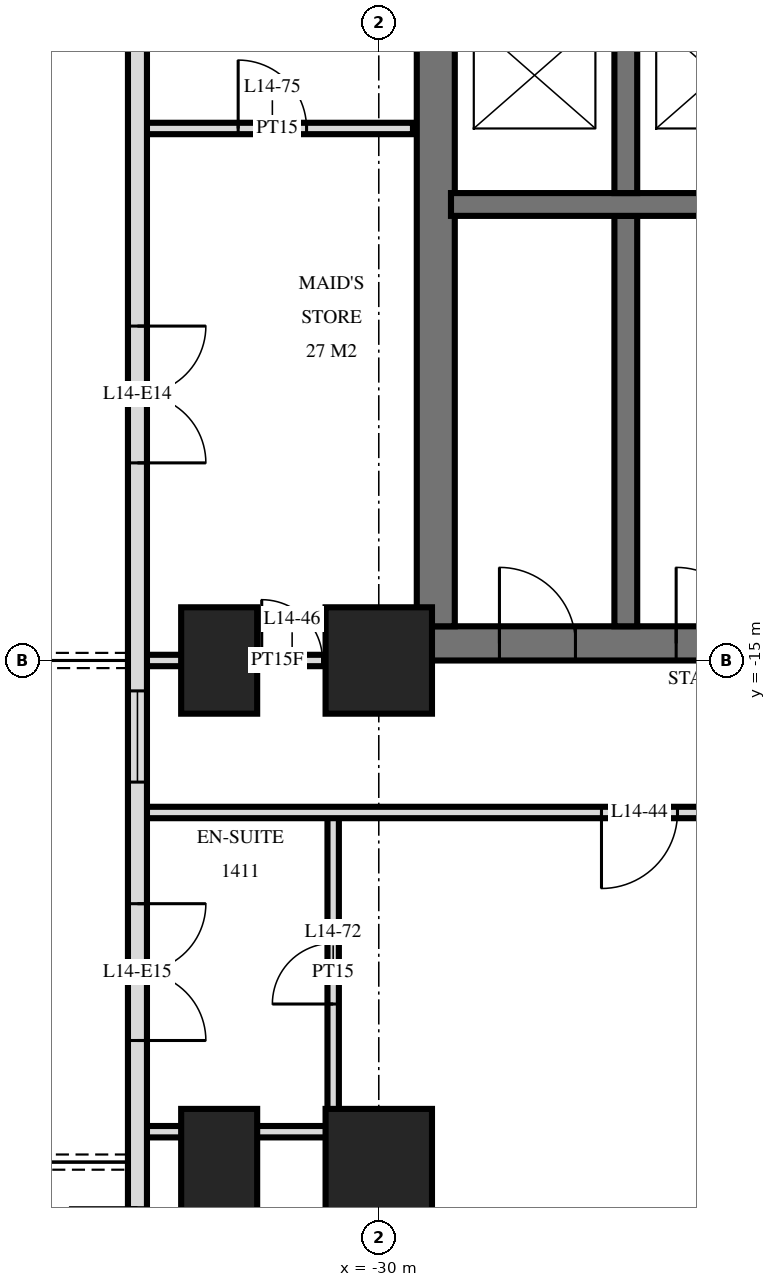
"""IFC4 building model, lengths in metres.
Left out: names, types, materials, properties, quantities, classifications, styles, units other than length and angle.
Written with IfcOpenShell. Run it as: python <this file> out.ifc"""

import sys

from ifc_helpers import new_model, si_unit, direction, frame, frame_2d, origin, origin_2d, place, context, subcontext, project, spatial, rectangle, extrude, element, fill, save


model = new_model("IFC4")
c1 = context("Model", 3, precision=1e-05, world=origin(), true_north=direction((0.0, 1.0)))
c2 = subcontext(c1, "Body", "Model", "MODEL_VIEW")
j1 = project(units=[si_unit("LENGTHUNIT", "METRE"), si_unit("PLANEANGLEUNIT", "RADIAN")], contexts=[c1])
p1 = place(None, origin())
s1 = spatial("IfcSite", under=j1, at=p1, CompositionType="ELEMENT")
p2 = place(p1, origin())
s2 = spatial("IfcBuilding", under=s1, at=p2, CompositionType="ELEMENT")
p3 = place(p2, frame((0.0, 0.0, 60.0)))
s3 = spatial("IfcBuildingStorey", under=s2, at=p3, CompositionType="ELEMENT", Elevation=60.0)
for number, where, z_axis, x_axis in (
    (1, (-32.1, -21.6, 0.0), (0.0, 0.0, 1.0), (0.0, 1.0, 0.0)),
    (2, (-32.1, -15.0, 0.0), (0.0, 0.0, 1.0), (0.0, 1.0, 0.0)),
):
    element("IfcColumn", number, at=place(p3, frame(where, z_axis=z_axis, x_axis=x_axis)), inside=s3, PredefinedType="COLUMN", context=c2, shape_type="SweptSolid", body=[
        extrude(rectangle(XDim=1.4, YDim=1.0, at=origin_2d()), origin(), (0.0, 0.0, 1.0), 3.6),
    ])
for number, where, z_axis, x_axis in (
    (3, (-30.0, -21.6, 0.0), (0.0, 0.0, 1.0), (1.0, 0.0, 0.0)),
    (4, (-30.0, -15.0, 0.0), (0.0, 0.0, 1.0), (1.0, 0.0, 0.0)),
):
    element("IfcColumn", number, at=place(p3, frame(where, z_axis=z_axis, x_axis=x_axis)), inside=s3, PredefinedType="COLUMN", context=c2, shape_type="SweptSolid", body=[
        extrude(rectangle(XDim=1.4, YDim=1.4, at=origin_2d()), origin(), (0.0, 0.0, 1.0), 3.6),
    ])
p4 = place(p3, frame((-29.5, -14.775, 0.0), z_axis=(0.0, 0.0, 1.0), x_axis=(1.0, 0.0, 0.0)))
e5 = element("IfcWall", 5, at=p4, inside=s3, PredefinedType="SHEAR", context=c2, shape_type="SweptSolid", body=[
    extrude(rectangle(XDim=19.5, YDim=0.45, at=frame_2d((9.75, 0.0))), origin(), (0.0, 0.0, 1.0), 3.6),
])
p5 = place(p4, frame((11.2, 0.0, 0.0)))
e6 = element("IfcOpeningElement", 6, at=p5, cuts=e5, PredefinedType="OPENING", context=c2, shape_type="SweptSolid", body=[
    extrude(rectangle(XDim=1.2, YDim=2.1, at=frame_2d((0.6, 1.05))), frame((0.0, 0.235, 0.0), z_axis=(0.0, -1.0, 0.0), x_axis=(1.0, 0.0, 0.0)), (0.0, 0.0, 1.0), 0.47),
])
p6 = place(p4, frame((14.25, 0.0, 0.0)))
e7 = element("IfcOpeningElement", 7, at=p6, cuts=e5, PredefinedType="OPENING", context=c2, shape_type="SweptSolid", body=[
    extrude(rectangle(XDim=1.1, YDim=2.1, at=frame_2d((0.55, 1.05))), frame((0.0, 0.235, 0.0), z_axis=(0.0, -1.0, 0.0), x_axis=(1.0, 0.0, 0.0)), (0.0, 0.0, 1.0), 0.47),
])
p7 = place(p4, frame((8.5, 0.0, 0.0)))
e8 = element("IfcOpeningElement", 8, at=p7, cuts=e5, PredefinedType="OPENING", context=c2, shape_type="SweptSolid", body=[
    extrude(rectangle(XDim=0.9, YDim=2.1, at=frame_2d((0.45, 1.05))), frame((0.0, 0.235, 0.0), z_axis=(0.0, -1.0, 0.0), x_axis=(1.0, 0.0, 0.0)), (0.0, 0.0, 1.0), 0.47),
])
p8 = place(p4, frame((6.05, 0.0, 0.0)))
e9 = element("IfcOpeningElement", 9, at=p8, cuts=e5, PredefinedType="OPENING", context=c2, shape_type="SweptSolid", body=[
    extrude(rectangle(XDim=1.0, YDim=2.1, at=frame_2d((0.5, 1.05))), frame((0.0, 0.235, 0.0), z_axis=(0.0, -1.0, 0.0), x_axis=(1.0, 0.0, 0.0)), (0.0, 0.0, 1.0), 0.47),
])
p9 = place(p4, frame((3.413, 0.0, 0.0)))
e10 = element("IfcOpeningElement", 10, at=p9, cuts=e5, PredefinedType="OPENING", context=c2, shape_type="SweptSolid", body=[
    extrude(rectangle(XDim=1.0, YDim=2.1, at=frame_2d((0.5, 1.05))), frame((0.0, 0.235, 0.0), z_axis=(0.0, -1.0, 0.0), x_axis=(1.0, 0.0, 0.0)), (0.0, 0.0, 1.0), 0.47),
])
p10 = place(p4, frame((1.087, 0.0, 0.0)))
e11 = element("IfcOpeningElement", 11, at=p10, cuts=e5, PredefinedType="OPENING", context=c2, shape_type="SweptSolid", body=[
    extrude(rectangle(XDim=1.0, YDim=2.1, at=frame_2d((0.5, 1.05))), frame((0.0, 0.235, 0.0), z_axis=(0.0, -1.0, 0.0), x_axis=(1.0, 0.0, 0.0)), (0.0, 0.0, 1.0), 0.47),
])
p11 = place(p3, frame((-29.25, -14.55, 0.0), z_axis=(0.0, 0.0, 1.0), x_axis=(0.0, 1.0, 0.0)))
e12 = element("IfcWall", 12, at=p11, inside=s3, PredefinedType="SHEAR", context=c2, shape_type="SweptSolid", body=[
    extrude(rectangle(XDim=14.1, YDim=0.5, at=frame_2d((7.05, 0.0))), origin(), (0.0, 0.0, 1.0), 3.6),
])
p12 = place(p3, frame((-29.05, -9.0, 0.0), z_axis=(0.0, 0.0, 1.0), x_axis=(1.0, 0.0, 0.0)))
e13 = element("IfcWall", 13, at=p12, inside=s3, PredefinedType="SHEAR", context=c2, shape_type="SweptSolid", body=[
    extrude(rectangle(XDim=18.7, YDim=0.3, at=frame_2d((9.35, 0.0))), origin(), (0.0, 0.0, 1.0), 3.6),
])
p13 = place(p12, frame((13.8, 0.0, 0.0)))
e14 = element("IfcOpeningElement", 14, at=p13, cuts=e13, PredefinedType="OPENING", context=c2, shape_type="SweptSolid", body=[
    extrude(rectangle(XDim=1.1, YDim=2.1, at=frame_2d((0.55, 1.05))), frame((0.0, 0.16, 0.0), z_axis=(0.0, -1.0, 0.0), x_axis=(1.0, 0.0, 0.0)), (0.0, 0.0, 1.0), 0.32),
])
p14 = place(p3, frame((-26.75, -8.85, 0.0), z_axis=(0.0, 0.0, 1.0), x_axis=(0.0, 1.0, 0.0)))
e15 = element("IfcWall", 15, at=p14, inside=s3, PredefinedType="SHEAR", context=c2, shape_type="SweptSolid", body=[
    extrude(rectangle(XDim=2.3, YDim=0.3, at=frame_2d((1.15, 0.0))), origin(), (0.0, 0.0, 1.0), 3.6),
])
p15 = place(p3, frame((-26.75, -14.55, 0.0), z_axis=(0.0, 0.0, 1.0), x_axis=(0.0, 1.0, 0.0)))
e16 = element("IfcWall", 16, at=p15, inside=s3, PredefinedType="SHEAR", context=c2, shape_type="SweptSolid", body=[
    extrude(rectangle(XDim=5.4, YDim=0.3, at=frame_2d((2.7, 0.0))), origin(), (0.0, 0.0, 1.0), 3.6),
])
p16 = place(p3, frame((-33.175, -3.325, 0.0), z_axis=(0.0, 0.0, 1.0), x_axis=(0.0, -1.0, 0.0)))
e17 = element("IfcWall", 17, at=p16, inside=s3, PredefinedType="SOLIDWALL", context=c2, shape_type="SweptSolid", body=[
    extrude(rectangle(XDim=21.551, YDim=0.25, at=frame_2d((10.775, 0.0))), origin(), (0.0, 0.0, 1.0), 3.32),
])
p17 = place(p16, frame((7.275, 0.0, 0.0)))
e18 = element("IfcOpeningElement", 18, at=p17, cuts=e17, PredefinedType="OPENING", context=c2, shape_type="SweptSolid", body=[
    extrude(rectangle(XDim=1.8, YDim=2.4, at=frame_2d((0.9, 1.2))), frame((0.0, 0.135, 0.0), z_axis=(0.0, -1.0, 0.0), x_axis=(1.0, 0.0, 0.0)), (0.0, 0.0, 1.0), 0.27),
])
p18 = place(p16, frame((12.075, 0.0, 0.3)))
e19 = element("IfcOpeningElement", 19, at=p18, cuts=e17, PredefinedType="OPENING", context=c2, shape_type="SweptSolid", body=[
    extrude(rectangle(XDim=1.2, YDim=2.1, at=frame_2d((0.6, 1.05))), frame((0.0, 0.135, 0.0), z_axis=(0.0, -1.0, 0.0), x_axis=(1.0, 0.0, 0.0)), (0.0, 0.0, 1.0), 0.27),
])
p19 = place(p16, frame((14.875, 0.0, 0.0)))
e20 = element("IfcOpeningElement", 20, at=p19, cuts=e17, PredefinedType="OPENING", context=c2, shape_type="SweptSolid", body=[
    extrude(rectangle(XDim=1.8, YDim=2.4, at=frame_2d((0.9, 1.2))), frame((0.0, 0.135, 0.0), z_axis=(0.0, -1.0, 0.0), x_axis=(1.0, 0.0, 0.0)), (0.0, 0.0, 1.0), 0.27),
])
p20 = place(p16, frame((18.875, 0.0, 0.0)))
e21 = element("IfcOpeningElement", 21, at=p20, cuts=e17, PredefinedType="OPENING", context=c2, shape_type="SweptSolid", body=[
    extrude(rectangle(XDim=1.8, YDim=2.4, at=frame_2d((0.9, 1.2))), frame((0.0, 0.135, 0.0), z_axis=(0.0, -1.0, 0.0), x_axis=(1.0, 0.0, 0.0)), (0.0, 0.0, 1.0), 0.27),
])
p21 = place(p3, frame((-30.6, -21.2, 0.0), z_axis=(0.0, 0.0, 1.0), x_axis=(0.0, 1.0, 0.0)))
e22 = element("IfcWall", 22, at=p21, inside=s3, PredefinedType="PARTITIONING", context=c2, shape_type="SweptSolid", body=[
    extrude(rectangle(XDim=4.2, YDim=0.15, at=frame_2d((2.1, 0.0))), origin(), (0.0, 0.0, 1.0), 3.32),
])
p22 = place(p21, frame((1.68, 0.0, 0.0)))
e23 = element("IfcOpeningElement", 23, at=p22, cuts=e22, PredefinedType="OPENING", context=c2, shape_type="SweptSolid", body=[
    extrude(rectangle(XDim=0.8, YDim=2.1, at=frame_2d((0.4, 1.05))), frame((0.0, 0.085, 0.0), z_axis=(0.0, -1.0, 0.0), x_axis=(1.0, 0.0, 0.0)), (0.0, 0.0, 1.0), 0.17),
])
p23 = place(p3, frame((-33.12, -21.2, 0.0), z_axis=(0.0, 0.0, 1.0), x_axis=(1.0, 0.0, 0.0)))
e24 = element("IfcWall", 24, at=p23, inside=s3, PredefinedType="PARTITIONING", context=c2, shape_type="SweptSolid", body=[
    extrude(rectangle(XDim=2.52, YDim=0.15, at=frame_2d((1.26, 0.0))), origin(), (0.0, 0.0, 1.0), 3.32),
])
p24 = place(p3, frame((-33.12, -17.0, 0.0), z_axis=(0.0, 0.0, 1.0), x_axis=(1.0, 0.0, 0.0)))
e25 = element("IfcWall", 25, at=p24, inside=s3, PredefinedType="PARTITIONING", context=c2, shape_type="SweptSolid", body=[
    extrude(rectangle(XDim=66.24, YDim=0.15, at=frame_2d((33.12, 0.0))), origin(), (0.0, 0.0, 1.0), 3.32),
])
p25 = place(p24, frame((12.27, 0.0, 0.0)))
e26 = element("IfcOpeningElement", 26, at=p25, cuts=e25, PredefinedType="OPENING", context=c2, shape_type="SweptSolid", body=[
    extrude(rectangle(XDim=1.0, YDim=2.1, at=frame_2d((0.5, 1.05))), frame((0.0, 0.085, 0.0), z_axis=(0.0, -1.0, 0.0), x_axis=(1.0, 0.0, 0.0)), (0.0, 0.0, 1.0), 0.17),
])
p26 = place(p24, frame((16.97, 0.0, 0.0)))
e27 = element("IfcOpeningElement", 27, at=p26, cuts=e25, PredefinedType="OPENING", context=c2, shape_type="SweptSolid", body=[
    extrude(rectangle(XDim=1.0, YDim=2.1, at=frame_2d((0.5, 1.05))), frame((0.0, 0.085, 0.0), z_axis=(0.0, -1.0, 0.0), x_axis=(1.0, 0.0, 0.0)), (0.0, 0.0, 1.0), 0.17),
])
p27 = place(p24, frame((18.27, 0.0, 0.0)))
e28 = element("IfcOpeningElement", 28, at=p27, cuts=e25, PredefinedType="OPENING", context=c2, shape_type="SweptSolid", body=[
    extrude(rectangle(XDim=1.0, YDim=2.1, at=frame_2d((0.5, 1.05))), frame((0.0, 0.085, 0.0), z_axis=(0.0, -1.0, 0.0), x_axis=(1.0, 0.0, 0.0)), (0.0, 0.0, 1.0), 0.17),
])
p28 = place(p24, frame((22.97, 0.0, 0.0)))
e29 = element("IfcOpeningElement", 29, at=p28, cuts=e25, PredefinedType="OPENING", context=c2, shape_type="SweptSolid", body=[
    extrude(rectangle(XDim=1.0, YDim=2.1, at=frame_2d((0.5, 1.05))), frame((0.0, 0.085, 0.0), z_axis=(0.0, -1.0, 0.0), x_axis=(1.0, 0.0, 0.0)), (0.0, 0.0, 1.0), 0.17),
])
p29 = place(p24, frame((24.27, 0.0, 0.0)))
e30 = element("IfcOpeningElement", 30, at=p29, cuts=e25, PredefinedType="OPENING", context=c2, shape_type="SweptSolid", body=[
    extrude(rectangle(XDim=1.0, YDim=2.1, at=frame_2d((0.5, 1.05))), frame((0.0, 0.085, 0.0), z_axis=(0.0, -1.0, 0.0), x_axis=(1.0, 0.0, 0.0)), (0.0, 0.0, 1.0), 0.17),
])
p30 = place(p24, frame((28.97, 0.0, 0.0)))
e31 = element("IfcOpeningElement", 31, at=p30, cuts=e25, PredefinedType="OPENING", context=c2, shape_type="SweptSolid", body=[
    extrude(rectangle(XDim=1.0, YDim=2.1, at=frame_2d((0.5, 1.05))), frame((0.0, 0.085, 0.0), z_axis=(0.0, -1.0, 0.0), x_axis=(1.0, 0.0, 0.0)), (0.0, 0.0, 1.0), 0.17),
])
p31 = place(p24, frame((30.27, 0.0, 0.0)))
e32 = element("IfcOpeningElement", 32, at=p31, cuts=e25, PredefinedType="OPENING", context=c2, shape_type="SweptSolid", body=[
    extrude(rectangle(XDim=1.0, YDim=2.1, at=frame_2d((0.5, 1.05))), frame((0.0, 0.085, 0.0), z_axis=(0.0, -1.0, 0.0), x_axis=(1.0, 0.0, 0.0)), (0.0, 0.0, 1.0), 0.17),
])
p32 = place(p24, frame((33.82, 0.0, 0.0)))
e33 = element("IfcOpeningElement", 33, at=p32, cuts=e25, PredefinedType="OPENING", context=c2, shape_type="SweptSolid", body=[
    extrude(rectangle(XDim=1.0, YDim=2.1, at=frame_2d((0.5, 1.05))), frame((0.0, 0.085, 0.0), z_axis=(0.0, -1.0, 0.0), x_axis=(1.0, 0.0, 0.0)), (0.0, 0.0, 1.0), 0.17),
])
p33 = place(p24, frame((46.27, 0.0, 0.0)))
e34 = element("IfcOpeningElement", 34, at=p33, cuts=e25, PredefinedType="OPENING", context=c2, shape_type="SweptSolid", body=[
    extrude(rectangle(XDim=1.0, YDim=2.1, at=frame_2d((0.5, 1.05))), frame((0.0, 0.085, 0.0), z_axis=(0.0, -1.0, 0.0), x_axis=(1.0, 0.0, 0.0)), (0.0, 0.0, 1.0), 0.17),
])
p34 = place(p24, frame((52.97, 0.0, 0.0)))
e35 = element("IfcOpeningElement", 35, at=p34, cuts=e25, PredefinedType="OPENING", context=c2, shape_type="SweptSolid", body=[
    extrude(rectangle(XDim=1.0, YDim=2.1, at=frame_2d((0.5, 1.05))), frame((0.0, 0.085, 0.0), z_axis=(0.0, -1.0, 0.0), x_axis=(1.0, 0.0, 0.0)), (0.0, 0.0, 1.0), 0.17),
])
p35 = place(p24, frame((6.05, 0.0, 0.0)))
e36 = element("IfcOpeningElement", 36, at=p35, cuts=e25, PredefinedType="OPENING", context=c2, shape_type="SweptSolid", body=[
    extrude(rectangle(XDim=1.0, YDim=2.1, at=frame_2d((0.5, 1.05))), frame((0.0, 0.085, 0.0), z_axis=(0.0, -1.0, 0.0), x_axis=(1.0, 0.0, 0.0)), (0.0, 0.0, 1.0), 0.17),
])
p36 = place(p24, frame((59.15, 0.0, 0.0)))
e37 = element("IfcOpeningElement", 37, at=p36, cuts=e25, PredefinedType="OPENING", context=c2, shape_type="SweptSolid", body=[
    extrude(rectangle(XDim=1.0, YDim=2.1, at=frame_2d((0.5, 1.05))), frame((0.0, 0.085, 0.0), z_axis=(0.0, -1.0, 0.0), x_axis=(1.0, 0.0, 0.0)), (0.0, 0.0, 1.0), 0.17),
])
p37 = place(p3, frame((-33.12, -15.0, 0.0), z_axis=(0.0, 0.0, 1.0), x_axis=(1.0, 0.0, 0.0)))
e38 = element("IfcWall", 38, at=p37, inside=s3, PredefinedType="PARTITIONING", context=c2, shape_type="SweptSolid", body=[
    extrude(rectangle(XDim=3.57, YDim=0.15, at=frame_2d((1.785, 0.0))), origin(), (0.0, 0.0, 1.0), 3.32),
])
p38 = place(p37, frame((1.58, 0.0, 0.0)))
e39 = element("IfcOpeningElement", 39, at=p38, cuts=e38, PredefinedType="OPENING", context=c2, shape_type="SweptSolid", body=[
    extrude(rectangle(XDim=0.8, YDim=2.1, at=frame_2d((0.4, 1.05))), frame((0.0, 0.085, 0.0), z_axis=(0.0, -1.0, 0.0), x_axis=(1.0, 0.0, 0.0)), (0.0, 0.0, 1.0), 0.17),
])
p39 = place(p3, frame((-33.12, -8.0, 0.0), z_axis=(0.0, 0.0, 1.0), x_axis=(1.0, 0.0, 0.0)))
e40 = element("IfcWall", 40, at=p39, inside=s3, PredefinedType="PARTITIONING", context=c2, shape_type="SweptSolid", body=[
    extrude(rectangle(XDim=3.57, YDim=0.15, at=frame_2d((1.785, 0.0))), origin(), (0.0, 0.0, 1.0), 3.32),
])
p40 = place(p39, frame((1.27, 0.0, 0.0)))
e41 = element("IfcOpeningElement", 41, at=p40, cuts=e40, PredefinedType="OPENING", context=c2, shape_type="SweptSolid", body=[
    extrude(rectangle(XDim=0.9, YDim=2.1, at=frame_2d((0.45, 1.05))), frame((0.0, 0.085, 0.0), z_axis=(0.0, -1.0, 0.0), x_axis=(1.0, 0.0, 0.0)), (0.0, 0.0, 1.0), 0.17),
])
p41 = place(p17, origin())
e42 = element("IfcDoor", 42, at=p41, inside=s3, OperationType="DOUBLE_DOOR_SINGLE_SWING", PredefinedType="DOOR", context=c2, shape_type="SweptSolid", body=[
    extrude(rectangle(XDim=1.8, YDim=2.4, at=frame_2d((0.9, 1.2))), frame((0.0, 0.025, 0.0), z_axis=(0.0, -1.0, 0.0), x_axis=(1.0, 0.0, 0.0)), (0.0, 0.0, 1.0), 0.05),
])
fill(e18, e42)
p42 = place(p18, origin())
e43 = element("IfcWindow", 43, at=p42, inside=s3, PartitioningType="SINGLE_PANEL", PredefinedType="WINDOW", context=c2, shape_type="SweptSolid", body=[
    extrude(rectangle(XDim=1.2, YDim=2.1, at=frame_2d((0.6, 1.05))), frame((0.0, 0.03, 0.0), z_axis=(0.0, -1.0, 0.0), x_axis=(1.0, 0.0, 0.0)), (0.0, 0.0, 1.0), 0.06),
])
fill(e19, e43)
p43 = place(p19, origin())
e44 = element("IfcDoor", 44, at=p43, inside=s3, OperationType="DOUBLE_DOOR_SINGLE_SWING", PredefinedType="DOOR", context=c2, shape_type="SweptSolid", body=[
    extrude(rectangle(XDim=1.8, YDim=2.4, at=frame_2d((0.9, 1.2))), frame((0.0, 0.025, 0.0), z_axis=(0.0, -1.0, 0.0), x_axis=(1.0, 0.0, 0.0)), (0.0, 0.0, 1.0), 0.05),
])
fill(e20, e44)
p44 = place(p9, origin())
e45 = element("IfcDoor", 45, at=p44, inside=s3, OperationType="SINGLE_SWING_RIGHT", PredefinedType="DOOR", context=c2, shape_type="SweptSolid", body=[
    extrude(rectangle(XDim=1.0, YDim=2.1, at=frame_2d((0.5, 1.05))), frame((0.0, 0.025, 0.0), z_axis=(0.0, -1.0, 0.0), x_axis=(1.0, 0.0, 0.0)), (0.0, 0.0, 1.0), 0.05),
])
fill(e10, e45)
p45 = place(p10, origin())
e46 = element("IfcDoor", 46, at=p45, inside=s3, OperationType="SINGLE_SWING_RIGHT", PredefinedType="DOOR", context=c2, shape_type="SweptSolid", body=[
    extrude(rectangle(XDim=1.0, YDim=2.1, at=frame_2d((0.5, 1.05))), frame((0.0, 0.025, 0.0), z_axis=(0.0, -1.0, 0.0), x_axis=(1.0, 0.0, 0.0)), (0.0, 0.0, 1.0), 0.05),
])
fill(e11, e46)
p46 = place(p35, frame((0.5, 0.0, 0.0), z_axis=(0.0, 0.0, 1.0), x_axis=(-1.0, 0.0, 0.0)))
e47 = element("IfcDoor", 47, at=p46, inside=s3, OperationType="SINGLE_SWING_LEFT", PredefinedType="DOOR", context=c2, shape_type="SweptSolid", body=[
    extrude(rectangle(XDim=1.0, YDim=2.1, at=frame_2d((0.0, 1.05))), frame((0.0, -0.025, 0.0), z_axis=(0.0, 1.0, 0.0), x_axis=(-1.0, 0.0, 0.0)), (0.0, 0.0, 1.0), 0.05),
])
fill(e36, e47)
p47 = place(p38, origin())
e48 = element("IfcDoor", 48, at=p47, inside=s3, OperationType="SINGLE_SWING_RIGHT", PredefinedType="DOOR", context=c2, shape_type="SweptSolid", body=[
    extrude(rectangle(XDim=0.8, YDim=2.1, at=frame_2d((0.4, 1.05))), frame((0.0, 0.025, 0.0), z_axis=(0.0, -1.0, 0.0), x_axis=(1.0, 0.0, 0.0)), (0.0, 0.0, 1.0), 0.05),
])
fill(e39, e48)
p48 = place(p22, origin())
e49 = element("IfcDoor", 49, at=p48, inside=s3, OperationType="SINGLE_SWING_RIGHT", PredefinedType="DOOR", context=c2, shape_type="SweptSolid", body=[
    extrude(rectangle(XDim=0.8, YDim=2.1, at=frame_2d((0.4, 1.05))), frame((0.0, 0.025, 0.0), z_axis=(0.0, -1.0, 0.0), x_axis=(1.0, 0.0, 0.0)), (0.0, 0.0, 1.0), 0.05),
])
fill(e23, e49)
p49 = place(p40, origin())
e50 = element("IfcDoor", 50, at=p49, inside=s3, OperationType="SINGLE_SWING_RIGHT", PredefinedType="DOOR", context=c2, shape_type="SweptSolid", body=[
    extrude(rectangle(XDim=0.9, YDim=2.1, at=frame_2d((0.45, 1.05))), frame((0.0, 0.025, 0.0), z_axis=(0.0, -1.0, 0.0), x_axis=(1.0, 0.0, 0.0)), (0.0, 0.0, 1.0), 0.05),
])
fill(e41, e50)
save(model, sys.argv[1])
